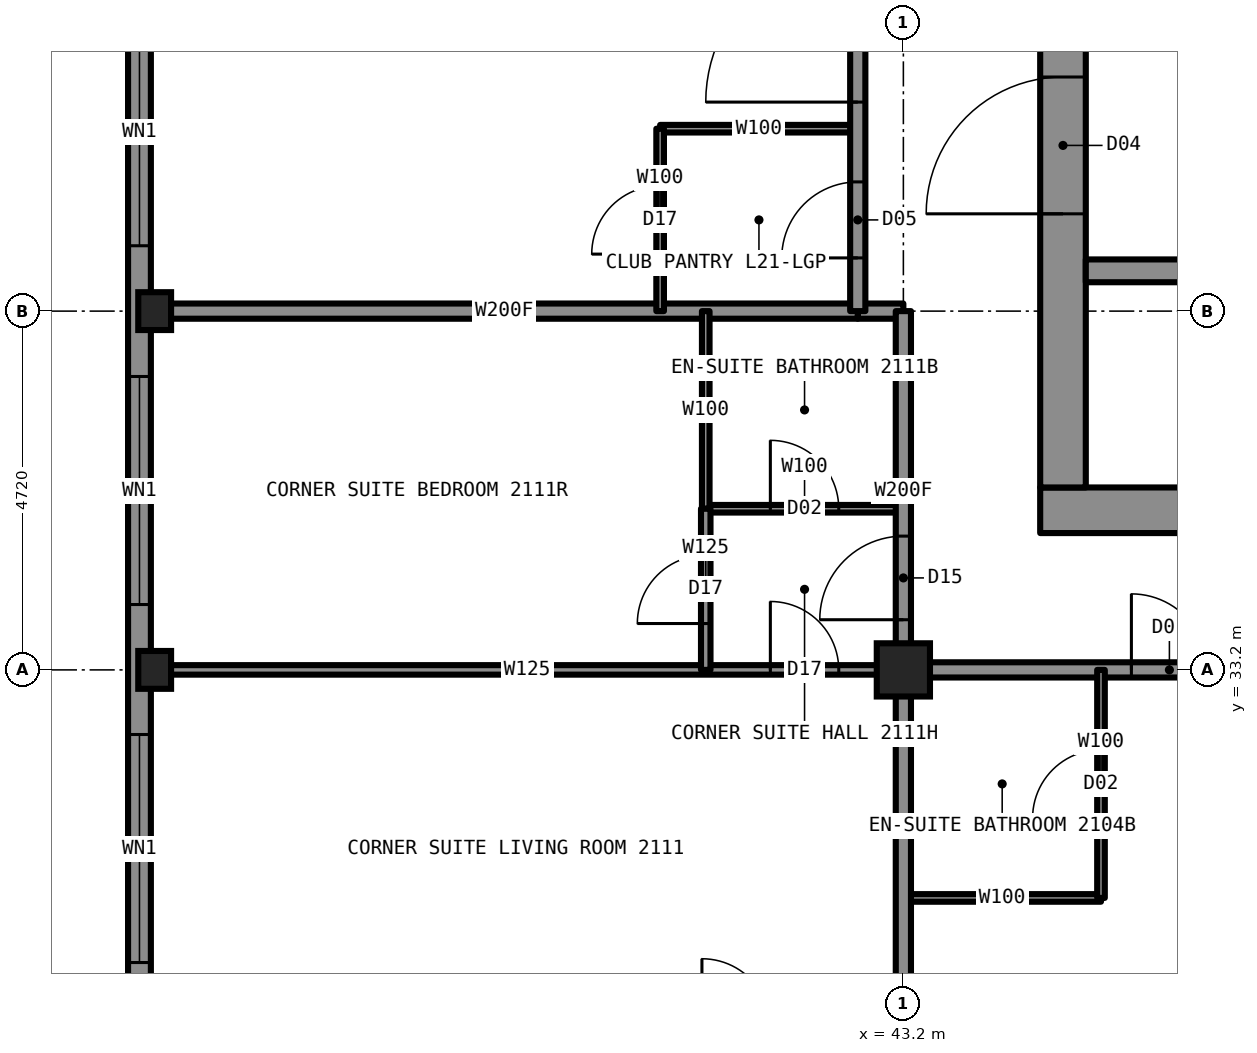
"""IFC4 building model, lengths in metres.
Left out: names, types, materials, properties, quantities, classifications, styles, units other than length and angle.
Written with IfcOpenShell. Run it as: python <this file> out.ifc"""

import sys

from ifc_helpers import new_model, si_unit, direction, frame, frame_2d, origin, origin_2d, place, context, subcontext, project, spatial, rectangle, hollow_rectangle, i_section, extrude, element, fill, save


model = new_model("IFC4")
c1 = context("Model", 3, precision=1e-05, world=origin(), true_north=direction((0.0, 1.0)))
c2 = subcontext(c1, "Body", "Model", "MODEL_VIEW")
j1 = project(units=[si_unit("LENGTHUNIT", "METRE"), si_unit("PLANEANGLEUNIT", "RADIAN")], contexts=[c1])
p1 = place(None, origin())
s1 = spatial("IfcSite", under=j1, at=p1, CompositionType="ELEMENT")
p2 = place(p1, origin())
s2 = spatial("IfcBuilding", under=s1, at=p2, CompositionType="ELEMENT")
p3 = place(p2, frame((0.0, 0.0, 81.0)))
s3 = spatial("IfcBuildingStorey", under=s2, at=p3, CompositionType="ELEMENT", Elevation=81.0)
for number, where, z_axis, x_axis in (
    (1, (33.35, 33.2, 0.0), (0.0, 0.0, 1.0), (1.0, 0.0, 0.0)),
    (2, (33.35, 37.92, 0.0), (0.0, 0.0, 1.0), (1.0, 0.0, 0.0)),
):
    element("IfcColumn", number, at=place(p3, frame(where, z_axis=z_axis, x_axis=x_axis)), inside=s3, PredefinedType="COLUMN", context=c2, shape_type="SweptSolid", body=[
        extrude(i_section(OverallWidth=0.432, OverallDepth=0.498, WebThickness=0.056, FlangeThickness=0.089, at=origin_2d()), origin(), (0.0, 0.0, 1.0), 3.5),
    ])
p4 = place(p3, frame((43.2, 33.2, 0.0), z_axis=(0.0, 0.0, 1.0), x_axis=(1.0, 0.0, 0.0)))
e3 = element("IfcColumn", 3, at=p4, inside=s3, PredefinedType="COLUMN", context=c2, shape_type="SweptSolid", body=[
    extrude(hollow_rectangle(XDim=0.7, YDim=0.7, WallThickness=0.06, at=origin_2d()), origin(), (0.0, 0.0, 1.0), 3.5),
])
p5 = place(p3, frame((45.0, 35.3, 0.0), z_axis=(0.0, 0.0, 1.0), x_axis=(1.0, 0.0, 0.0)))
e4 = element("IfcWall", 4, at=p5, inside=s3, PredefinedType="SHEAR", context=c2, shape_type="SweptSolid", body=[
    extrude(rectangle(XDim=20.0, YDim=0.6, at=frame_2d((10.0, 0.0))), origin(), (0.0, 0.0, 1.0), 3.5),
])
p6 = place(p3, frame((45.3, 35.6, 0.0), z_axis=(0.0, 0.0, 1.0), x_axis=(0.0, 1.0, 0.0)))
e5 = element("IfcWall", 5, at=p6, inside=s3, PredefinedType="SHEAR", context=c2, shape_type="SweptSolid", body=[
    extrude(rectangle(XDim=18.8, YDim=0.6, at=frame_2d((9.4, 0.0))), origin(), (0.0, 0.0, 1.0), 3.5),
])
p7 = place(p6, frame((13.4, 0.0, 0.0)))
e6 = element("IfcOpeningElement", 6, at=p7, cuts=e5, PredefinedType="OPENING", context=c2, shape_type="SweptSolid", body=[
    extrude(rectangle(XDim=1.8, YDim=2.2, at=frame_2d((0.9, 1.1))), frame((0.0, 0.31, 0.0), z_axis=(0.0, -1.0, 0.0), x_axis=(1.0, 0.0, 0.0)), (0.0, 0.0, 1.0), 0.62),
])
p8 = place(p6, frame((3.6, 0.0, 0.0)))
e7 = element("IfcOpeningElement", 7, at=p8, cuts=e5, PredefinedType="OPENING", context=c2, shape_type="SweptSolid", body=[
    extrude(rectangle(XDim=1.8, YDim=2.2, at=frame_2d((0.9, 1.1))), frame((0.0, 0.31, 0.0), z_axis=(0.0, -1.0, 0.0), x_axis=(1.0, 0.0, 0.0)), (0.0, 0.0, 1.0), 0.62),
])
p9 = place(p6, frame((6.4, 0.0, 0.0)))
e8 = element("IfcOpeningElement", 8, at=p9, cuts=e5, PredefinedType="OPENING", context=c2, shape_type="SweptSolid", body=[
    extrude(rectangle(XDim=1.2, YDim=2.2, at=frame_2d((0.6, 1.1))), frame((0.0, 0.31, 0.0), z_axis=(0.0, -1.0, 0.0), x_axis=(1.0, 0.0, 0.0)), (0.0, 0.0, 1.0), 0.62),
])
p10 = place(p3, frame((45.6, 38.45, 0.0), z_axis=(0.0, 0.0, 1.0), x_axis=(1.0, 0.0, 0.0)))
e9 = element("IfcWall", 9, at=p10, inside=s3, PredefinedType="SHEAR", context=c2, shape_type="SweptSolid", body=[
    extrude(rectangle(XDim=18.8, YDim=0.3, at=frame_2d((9.4, 0.0))), origin(), (0.0, 0.0, 1.0), 3.5),
])
p11 = place(p3, frame((43.2, 33.2, 0.0), z_axis=(0.0, 0.0, 1.0), x_axis=(1.0, 0.0, 0.0)))
e10 = element("IfcWall", 10, at=p11, inside=s3, PredefinedType="PARTITIONING", context=c2, shape_type="SweptSolid", body=[
    extrude(rectangle(XDim=23.6, YDim=0.2, at=frame_2d((11.8, 0.0))), origin(), (0.0, 0.0, 1.0), 3.33),
])
p12 = place(p11, frame((3.0, 0.0, 0.0)))
e11 = element("IfcOpeningElement", 11, at=p12, cuts=e10, PredefinedType="OPENING", context=c2, shape_type="SweptSolid", body=[
    extrude(rectangle(XDim=1.0, YDim=2.2, at=frame_2d((0.5, 1.1))), frame((0.0, 0.11, 0.0), z_axis=(0.0, -1.0, 0.0), x_axis=(1.0, 0.0, 0.0)), (0.0, 0.0, 1.0), 0.22),
])
p13 = place(p11, frame((11.29, 0.0, 0.0)))
e12 = element("IfcOpeningElement", 12, at=p13, cuts=e10, PredefinedType="OPENING", context=c2, shape_type="SweptSolid", body=[
    extrude(rectangle(XDim=1.1, YDim=2.2, at=frame_2d((0.55, 1.1))), frame((0.0, 0.11, 0.0), z_axis=(0.0, -1.0, 0.0), x_axis=(1.0, 0.0, 0.0)), (0.0, 0.0, 1.0), 0.22),
])
p14 = place(p3, frame((33.3, 33.2, 0.0), z_axis=(0.0, 0.0, 1.0), x_axis=(1.0, 0.0, 0.0)))
e13 = element("IfcWall", 13, at=p14, inside=s3, PredefinedType="PARTITIONING", context=c2, shape_type="SweptSolid", body=[
    extrude(rectangle(XDim=9.9, YDim=0.125, at=frame_2d((4.95, 0.0))), origin(), (0.0, 0.0, 1.0), 2.573),
])
p15 = place(p14, frame((8.15, 0.0, 0.0)))
e14 = element("IfcOpeningElement", 14, at=p15, cuts=e13, PredefinedType="OPENING", context=c2, shape_type="SweptSolid", body=[
    extrude(rectangle(XDim=0.9, YDim=2.2, at=frame_2d((0.45, 1.1))), frame((0.0, 0.073, 0.0), z_axis=(0.0, -1.0, 0.0), x_axis=(1.0, 0.0, 0.0)), (0.0, 0.0, 1.0), 0.145),
])
p16 = place(p3, frame((43.2, 30.2, 0.0), z_axis=(0.0, 0.0, 1.0), x_axis=(1.0, 0.0, 0.0)))
e15 = element("IfcWall", 15, at=p16, inside=s3, PredefinedType="PARTITIONING", context=c2, shape_type="SweptSolid", body=[
    extrude(rectangle(XDim=2.6, YDim=0.1, at=frame_2d((1.3, 0.0))), origin(), (0.0, 0.0, 1.0), 3.33),
])
p17 = place(p3, frame((40.0, 40.32, 0.0), z_axis=(0.0, 0.0, 1.0), x_axis=(1.0, 0.0, 0.0)))
e16 = element("IfcWall", 16, at=p17, inside=s3, PredefinedType="PARTITIONING", context=c2, shape_type="SweptSolid", body=[
    extrude(rectangle(XDim=2.6, YDim=0.1, at=frame_2d((1.3, 0.0))), origin(), (0.0, 0.0, 1.0), 2.723),
])
p18 = place(p3, frame((42.6, 37.92, 0.0), z_axis=(0.0, 0.0, 1.0), x_axis=(1.0, 0.0, 0.0)))
e17 = element("IfcWall", 17, at=p18, inside=s3, PredefinedType="PARTITIONING", context=c2, shape_type="SweptSolid", body=[
    extrude(rectangle(XDim=0.6, YDim=0.2, at=frame_2d((0.3, 0.0))), origin(), (0.0, 0.0, 1.0), 2.573),
])
p19 = place(p3, frame((33.3, 37.92, 0.0), z_axis=(0.0, 0.0, 1.0), x_axis=(1.0, 0.0, 0.0)))
e18 = element("IfcWall", 18, at=p19, inside=s3, PredefinedType="PARTITIONING", context=c2, shape_type="SweptSolid", body=[
    extrude(rectangle(XDim=9.3, YDim=0.2, at=frame_2d((4.65, 0.0))), origin(), (0.0, 0.0, 1.0), 2.573),
])
p20 = place(p3, frame((40.6, 35.32, 0.0), z_axis=(0.0, 0.0, 1.0), x_axis=(1.0, 0.0, 0.0)))
e19 = element("IfcWall", 19, at=p20, inside=s3, PredefinedType="PARTITIONING", context=c2, shape_type="SweptSolid", body=[
    extrude(rectangle(XDim=2.6, YDim=0.1, at=frame_2d((1.3, 0.0))), origin(), (0.0, 0.0, 1.0), 3.33),
])
p21 = place(p20, frame((0.85, 0.0, 0.0)))
e20 = element("IfcOpeningElement", 20, at=p21, cuts=e19, PredefinedType="OPENING", context=c2, shape_type="SweptSolid", body=[
    extrude(rectangle(XDim=0.9, YDim=2.1, at=frame_2d((0.45, 1.05))), frame((0.0, 0.06, 0.0), z_axis=(0.0, -1.0, 0.0), x_axis=(1.0, 0.0, 0.0)), (0.0, 0.0, 1.0), 0.12),
])
p22 = place(p3, frame((43.2, 33.2, 0.0), z_axis=(0.0, 0.0, 1.0), x_axis=(0.0, 1.0, 0.0)))
e21 = element("IfcWall", 21, at=p22, inside=s3, PredefinedType="PARTITIONING", context=c2, shape_type="SweptSolid", body=[
    extrude(rectangle(XDim=4.72, YDim=0.2, at=frame_2d((2.36, 0.0))), origin(), (0.0, 0.0, 1.0), 3.33),
])
p23 = place(p22, frame((0.66, 0.0, 0.0)))
e22 = element("IfcOpeningElement", 22, at=p23, cuts=e21, PredefinedType="OPENING", context=c2, shape_type="SweptSolid", body=[
    extrude(rectangle(XDim=1.1, YDim=2.2, at=frame_2d((0.55, 1.1))), frame((0.0, 0.11, 0.0), z_axis=(0.0, -1.0, 0.0), x_axis=(1.0, 0.0, 0.0)), (0.0, 0.0, 1.0), 0.22),
])
p24 = place(p3, frame((43.2, 23.3, 0.0), z_axis=(0.0, 0.0, 1.0), x_axis=(0.0, 1.0, 0.0)))
e23 = element("IfcWall", 23, at=p24, inside=s3, PredefinedType="PARTITIONING", context=c2, shape_type="SweptSolid", body=[
    extrude(rectangle(XDim=9.9, YDim=0.2, at=frame_2d((4.95, 0.0))), origin(), (0.0, 0.0, 1.0), 2.573),
])
p25 = place(p3, frame((42.6, 37.92, 0.0), z_axis=(0.0, 0.0, 1.0), x_axis=(0.0, 1.0, 0.0)))
e24 = element("IfcWall", 24, at=p25, inside=s3, PredefinedType="PARTITIONING", context=c2, shape_type="SweptSolid", body=[
    extrude(rectangle(XDim=14.16, YDim=0.2, at=frame_2d((7.08, 0.0))), origin(), (0.0, 0.0, 1.0), 3.33),
])
p26 = place(p25, frame((9.84, 0.0, 0.0)))
e25 = element("IfcOpeningElement", 25, at=p26, cuts=e24, PredefinedType="OPENING", context=c2, shape_type="SweptSolid", body=[
    extrude(rectangle(XDim=1.0, YDim=2.2, at=frame_2d((0.5, 1.1))), frame((0.0, 0.11, 0.0), z_axis=(0.0, -1.0, 0.0), x_axis=(1.0, 0.0, 0.0)), (0.0, 0.0, 1.0), 0.22),
])
p27 = place(p25, frame((2.75, 0.0, 0.0)))
e26 = element("IfcOpeningElement", 26, at=p27, cuts=e24, PredefinedType="OPENING", context=c2, shape_type="SweptSolid", body=[
    extrude(rectangle(XDim=2.0, YDim=2.4, at=frame_2d((1.0, 1.2))), frame((0.0, 0.11, 0.0), z_axis=(0.0, -1.0, 0.0), x_axis=(1.0, 0.0, 0.0)), (0.0, 0.0, 1.0), 0.22),
])
p28 = place(p25, frame((0.7, 0.0, 0.0)))
e27 = element("IfcOpeningElement", 27, at=p28, cuts=e24, PredefinedType="OPENING", context=c2, shape_type="SweptSolid", body=[
    extrude(rectangle(XDim=1.0, YDim=2.1, at=frame_2d((0.5, 1.05))), frame((0.0, 0.11, 0.0), z_axis=(0.0, -1.0, 0.0), x_axis=(1.0, 0.0, 0.0)), (0.0, 0.0, 1.0), 0.22),
])
p29 = place(p3, frame((40.6, 35.32, 0.0), z_axis=(0.0, 0.0, 1.0), x_axis=(0.0, 1.0, 0.0)))
e28 = element("IfcWall", 28, at=p29, inside=s3, PredefinedType="PARTITIONING", context=c2, shape_type="SweptSolid", body=[
    extrude(rectangle(XDim=2.6, YDim=0.1, at=frame_2d((1.3, 0.0))), origin(), (0.0, 0.0, 1.0), 3.33),
])
p30 = place(p3, frame((40.6, 33.2, 0.0), z_axis=(0.0, 0.0, 1.0), x_axis=(0.0, 1.0, 0.0)))
e29 = element("IfcWall", 29, at=p30, inside=s3, PredefinedType="PARTITIONING", context=c2, shape_type="SweptSolid", body=[
    extrude(rectangle(XDim=2.12, YDim=0.125, at=frame_2d((1.06, 0.0))), origin(), (0.0, 0.0, 1.0), 3.33),
])
p31 = place(p30, frame((0.61, 0.0, 0.0)))
e30 = element("IfcOpeningElement", 30, at=p31, cuts=e29, PredefinedType="OPENING", context=c2, shape_type="SweptSolid", body=[
    extrude(rectangle(XDim=0.9, YDim=2.2, at=frame_2d((0.45, 1.1))), frame((0.0, 0.073, 0.0), z_axis=(0.0, -1.0, 0.0), x_axis=(1.0, 0.0, 0.0)), (0.0, 0.0, 1.0), 0.145),
])
p32 = place(p3, frame((40.0, 37.92, 0.0), z_axis=(0.0, 0.0, 1.0), x_axis=(0.0, 1.0, 0.0)))
e31 = element("IfcWall", 31, at=p32, inside=s3, PredefinedType="PARTITIONING", context=c2, shape_type="SweptSolid", body=[
    extrude(rectangle(XDim=2.4, YDim=0.1, at=frame_2d((1.2, 0.0))), origin(), (0.0, 0.0, 1.0), 3.33),
])
p33 = place(p32, frame((0.75, 0.0, 0.0)))
e32 = element("IfcOpeningElement", 32, at=p33, cuts=e31, PredefinedType="OPENING", context=c2, shape_type="SweptSolid", body=[
    extrude(rectangle(XDim=0.9, YDim=2.2, at=frame_2d((0.45, 1.1))), frame((0.0, 0.06, 0.0), z_axis=(0.0, -1.0, 0.0), x_axis=(1.0, 0.0, 0.0)), (0.0, 0.0, 1.0), 0.12),
])
p34 = place(p3, frame((45.8, 30.2, 0.0), z_axis=(0.0, 0.0, 1.0), x_axis=(0.0, 1.0, 0.0)))
e33 = element("IfcWall", 33, at=p34, inside=s3, PredefinedType="PARTITIONING", context=c2, shape_type="SweptSolid", body=[
    extrude(rectangle(XDim=3.0, YDim=0.1, at=frame_2d((1.5, 0.0))), origin(), (0.0, 0.0, 1.0), 3.33),
])
p35 = place(p34, frame((1.05, 0.0, 0.0)))
e34 = element("IfcOpeningElement", 34, at=p35, cuts=e33, PredefinedType="OPENING", context=c2, shape_type="SweptSolid", body=[
    extrude(rectangle(XDim=0.9, YDim=2.1, at=frame_2d((0.45, 1.05))), frame((0.0, 0.06, 0.0), z_axis=(0.0, -1.0, 0.0), x_axis=(1.0, 0.0, 0.0)), (0.0, 0.0, 1.0), 0.12),
])
p36 = place(p3, frame((33.15, 61.5, 0.0), z_axis=(0.0, 0.0, 1.0), x_axis=(0.0, -1.0, 0.0)))
e35 = element("IfcWall", 35, at=p36, inside=s3, PredefinedType="SOLIDWALL", context=c2, shape_type="SweptSolid", body=[
    extrude(rectangle(XDim=33.0, YDim=0.3, at=frame_2d((16.5, 0.0))), origin(), (0.0, 0.0, 1.0), 2.63),
])
p37 = place(p36, frame((0.85, 0.0, 0.5)))
e36 = element("IfcOpeningElement", 36, at=p37, cuts=e35, PredefinedType="OPENING", context=c2, shape_type="SweptSolid", body=[
    extrude(rectangle(XDim=3.0, YDim=2.0, at=frame_2d((1.5, 1.0))), frame((0.0, 0.16, 0.0), z_axis=(0.0, -1.0, 0.0), x_axis=(1.0, 0.0, 0.0)), (0.0, 0.0, 1.0), 0.32),
])
p38 = place(p36, frame((5.56, 0.0, 0.5)))
e37 = element("IfcOpeningElement", 37, at=p38, cuts=e35, PredefinedType="OPENING", context=c2, shape_type="SweptSolid", body=[
    extrude(rectangle(XDim=3.0, YDim=2.0, at=frame_2d((1.5, 1.0))), frame((0.0, 0.16, 0.0), z_axis=(0.0, -1.0, 0.0), x_axis=(1.0, 0.0, 0.0)), (0.0, 0.0, 1.0), 0.32),
])
p39 = place(p36, frame((10.28, 0.0, 0.5)))
e38 = element("IfcOpeningElement", 38, at=p39, cuts=e35, PredefinedType="OPENING", context=c2, shape_type="SweptSolid", body=[
    extrude(rectangle(XDim=3.0, YDim=2.0, at=frame_2d((1.5, 1.0))), frame((0.0, 0.16, 0.0), z_axis=(0.0, -1.0, 0.0), x_axis=(1.0, 0.0, 0.0)), (0.0, 0.0, 1.0), 0.32),
])
p40 = place(p36, frame((15.0, 0.0, 0.5)))
e39 = element("IfcOpeningElement", 39, at=p40, cuts=e35, PredefinedType="OPENING", context=c2, shape_type="SweptSolid", body=[
    extrude(rectangle(XDim=3.0, YDim=2.0, at=frame_2d((1.5, 1.0))), frame((0.0, 0.16, 0.0), z_axis=(0.0, -1.0, 0.0), x_axis=(1.0, 0.0, 0.0)), (0.0, 0.0, 1.0), 0.32),
])
p41 = place(p36, frame((19.72, 0.0, 0.5)))
e40 = element("IfcOpeningElement", 40, at=p41, cuts=e35, PredefinedType="OPENING", context=c2, shape_type="SweptSolid", body=[
    extrude(rectangle(XDim=3.0, YDim=2.0, at=frame_2d((1.5, 1.0))), frame((0.0, 0.16, 0.0), z_axis=(0.0, -1.0, 0.0), x_axis=(1.0, 0.0, 0.0)), (0.0, 0.0, 1.0), 0.32),
])
p42 = place(p36, frame((24.44, 0.0, 0.5)))
e41 = element("IfcOpeningElement", 41, at=p42, cuts=e35, PredefinedType="OPENING", context=c2, shape_type="SweptSolid", body=[
    extrude(rectangle(XDim=3.0, YDim=2.0, at=frame_2d((1.5, 1.0))), frame((0.0, 0.16, 0.0), z_axis=(0.0, -1.0, 0.0), x_axis=(1.0, 0.0, 0.0)), (0.0, 0.0, 1.0), 0.32),
])
p43 = place(p36, frame((29.15, 0.0, 0.5)))
e42 = element("IfcOpeningElement", 42, at=p43, cuts=e35, PredefinedType="OPENING", context=c2, shape_type="SweptSolid", body=[
    extrude(rectangle(XDim=3.0, YDim=2.0, at=frame_2d((1.5, 1.0))), frame((0.0, 0.16, 0.0), z_axis=(0.0, -1.0, 0.0), x_axis=(1.0, 0.0, 0.0)), (0.0, 0.0, 1.0), 0.32),
])
p44 = place(p12, origin())
e43 = element("IfcDoor", 43, at=p44, inside=s3, OperationType="SINGLE_SWING_LEFT", PredefinedType="DOOR", context=c2, shape_type="SweptSolid", body=[
    extrude(rectangle(XDim=1.0, YDim=2.2, at=frame_2d((0.5, 1.1))), frame((0.0, 0.025, 0.0), z_axis=(0.0, -1.0, 0.0), x_axis=(1.0, 0.0, 0.0)), (0.0, 0.0, 1.0), 0.05),
])
fill(e11, e43)
p45 = place(p35, origin())
e44 = element("IfcDoor", 44, at=p45, inside=s3, OperationType="SINGLE_SWING_RIGHT", PredefinedType="DOOR", context=c2, shape_type="SweptSolid", body=[
    extrude(rectangle(XDim=0.9, YDim=2.1, at=frame_2d((0.45, 1.05))), frame((0.0, 0.025, 0.0), z_axis=(0.0, -1.0, 0.0), x_axis=(1.0, 0.0, 0.0)), (0.0, 0.0, 1.0), 0.05),
])
fill(e34, e44)
p46 = place(p15, origin())
e45 = element("IfcDoor", 45, at=p46, inside=s3, OperationType="SINGLE_SWING_LEFT", PredefinedType="DOOR", context=c2, shape_type="SweptSolid", body=[
    extrude(rectangle(XDim=0.9, YDim=2.2, at=frame_2d((0.45, 1.1))), frame((0.0, 0.025, 0.0), z_axis=(0.0, -1.0, 0.0), x_axis=(1.0, 0.0, 0.0)), (0.0, 0.0, 1.0), 0.05),
])
fill(e14, e45)
p47 = place(p21, origin())
e46 = element("IfcDoor", 46, at=p47, inside=s3, OperationType="SINGLE_SWING_RIGHT", PredefinedType="DOOR", context=c2, shape_type="SweptSolid", body=[
    extrude(rectangle(XDim=0.9, YDim=2.1, at=frame_2d((0.45, 1.05))), frame((0.0, 0.025, 0.0), z_axis=(0.0, -1.0, 0.0), x_axis=(1.0, 0.0, 0.0)), (0.0, 0.0, 1.0), 0.05),
])
fill(e20, e46)
p48 = place(p23, origin())
e47 = element("IfcDoor", 47, at=p48, inside=s3, OperationType="SINGLE_SWING_LEFT", PredefinedType="DOOR", context=c2, shape_type="SweptSolid", body=[
    extrude(rectangle(XDim=1.1, YDim=2.2, at=frame_2d((0.55, 1.1))), frame((0.0, 0.025, 0.0), z_axis=(0.0, -1.0, 0.0), x_axis=(1.0, 0.0, 0.0)), (0.0, 0.0, 1.0), 0.05),
])
fill(e22, e47)
p49 = place(p31, origin())
e48 = element("IfcDoor", 48, at=p49, inside=s3, OperationType="SINGLE_SWING_LEFT", PredefinedType="DOOR", context=c2, shape_type="SweptSolid", body=[
    extrude(rectangle(XDim=0.9, YDim=2.2, at=frame_2d((0.45, 1.1))), frame((0.0, 0.025, 0.0), z_axis=(0.0, -1.0, 0.0), x_axis=(1.0, 0.0, 0.0)), (0.0, 0.0, 1.0), 0.05),
])
fill(e30, e48)
p50 = place(p27, origin())
e49 = element("IfcDoor", 49, at=p50, inside=s3, OperationType="DOUBLE_DOOR_SINGLE_SWING", PredefinedType="DOOR", context=c2, shape_type="SweptSolid", body=[
    extrude(rectangle(XDim=2.0, YDim=2.4, at=frame_2d((1.0, 1.2))), frame((0.0, 0.025, 0.0), z_axis=(0.0, -1.0, 0.0), x_axis=(1.0, 0.0, 0.0)), (0.0, 0.0, 1.0), 0.05),
])
fill(e26, e49)
p51 = place(p33, origin())
e50 = element("IfcDoor", 50, at=p51, inside=s3, OperationType="SINGLE_SWING_LEFT", PredefinedType="DOOR", context=c2, shape_type="SweptSolid", body=[
    extrude(rectangle(XDim=0.9, YDim=2.2, at=frame_2d((0.45, 1.1))), frame((0.0, 0.025, 0.0), z_axis=(0.0, -1.0, 0.0), x_axis=(1.0, 0.0, 0.0)), (0.0, 0.0, 1.0), 0.05),
])
fill(e32, e50)
p52 = place(p28, origin())
e51 = element("IfcDoor", 51, at=p52, inside=s3, OperationType="SINGLE_SWING_LEFT", PredefinedType="DOOR", context=c2, shape_type="SweptSolid", body=[
    extrude(rectangle(XDim=1.0, YDim=2.1, at=frame_2d((0.5, 1.05))), frame((0.0, 0.025, 0.0), z_axis=(0.0, -1.0, 0.0), x_axis=(1.0, 0.0, 0.0)), (0.0, 0.0, 1.0), 0.05),
])
fill(e27, e51)
p53 = place(p41, origin())
e52 = element("IfcWindow", 52, at=p53, inside=s3, PartitioningType="SINGLE_PANEL", PredefinedType="WINDOW", context=c2, shape_type="SweptSolid", body=[
    extrude(rectangle(XDim=3.0, YDim=2.0, at=frame_2d((1.5, 1.0))), frame((0.0, 0.03, 0.0), z_axis=(0.0, -1.0, 0.0), x_axis=(1.0, 0.0, 0.0)), (0.0, 0.0, 1.0), 0.06),
])
fill(e40, e52)
p54 = place(p42, origin())
e53 = element("IfcWindow", 53, at=p54, inside=s3, PartitioningType="SINGLE_PANEL", PredefinedType="WINDOW", context=c2, shape_type="SweptSolid", body=[
    extrude(rectangle(XDim=3.0, YDim=2.0, at=frame_2d((1.5, 1.0))), frame((0.0, 0.03, 0.0), z_axis=(0.0, -1.0, 0.0), x_axis=(1.0, 0.0, 0.0)), (0.0, 0.0, 1.0), 0.06),
])
fill(e41, e53)
p55 = place(p43, origin())
e54 = element("IfcWindow", 54, at=p55, inside=s3, PartitioningType="SINGLE_PANEL", PredefinedType="WINDOW", context=c2, shape_type="SweptSolid", body=[
    extrude(rectangle(XDim=3.0, YDim=2.0, at=frame_2d((1.5, 1.0))), frame((0.0, 0.03, 0.0), z_axis=(0.0, -1.0, 0.0), x_axis=(1.0, 0.0, 0.0)), (0.0, 0.0, 1.0), 0.06),
])
fill(e42, e54)
p56 = place(p8, origin())
e55 = element("IfcDoor", 55, at=p56, inside=s3, OperationType="DOUBLE_DOOR_SINGLE_SWING", PredefinedType="DOOR", context=c2, shape_type="SweptSolid", body=[
    extrude(rectangle(XDim=1.8, YDim=2.2, at=frame_2d((0.9, 1.1))), frame((0.0, 0.025, 0.0), z_axis=(0.0, -1.0, 0.0), x_axis=(1.0, 0.0, 0.0)), (0.0, 0.0, 1.0), 0.05),
])
fill(e7, e55)
save(model, sys.argv[1])
